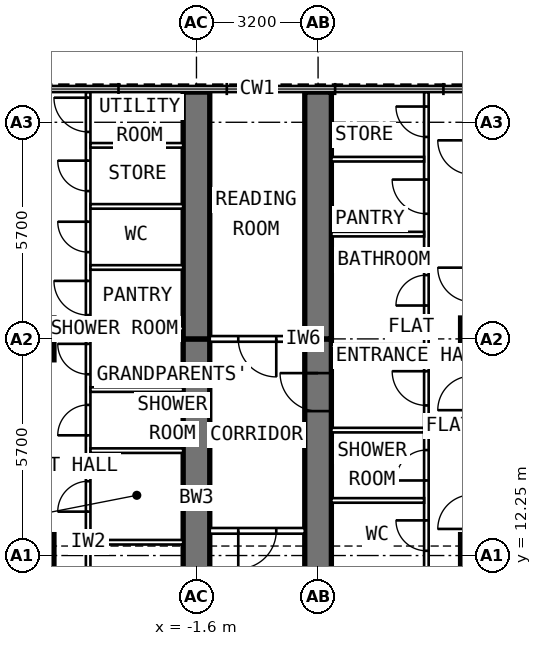
"""IFC4 building model, lengths in metres.
Left out: names, types, materials, properties, quantities, classifications, styles, units other than length and angle.
Written with IfcOpenShell. Run it as: python <this file> out.ifc"""

import sys

from ifc_helpers import new_model, si_unit, direction, frame, frame_2d, origin, origin_2d, place, context, subcontext, project, spatial, rectangle, extrude, element, fill, save


model = new_model("IFC4")
c1 = context("Model", 3, precision=1e-05, world=origin(), true_north=direction((0.0, 1.0)))
c2 = subcontext(c1, "Body", "Model", "MODEL_VIEW")
j1 = project(units=[si_unit("LENGTHUNIT", "METRE"), si_unit("PLANEANGLEUNIT", "RADIAN")], contexts=[c1])
p1 = place(None, origin())
s1 = spatial("IfcSite", under=j1, at=p1, CompositionType="ELEMENT")
p2 = place(p1, origin())
s2 = spatial("IfcBuilding", under=s1, at=p2, CompositionType="ELEMENT")
p3 = place(p2, frame((0.0, 0.0, 215.4)))
s3 = spatial("IfcBuildingStorey", under=s2, at=p3, CompositionType="ELEMENT", Elevation=215.4)
for number, where, z_axis, x_axis in (
    (1, (-5.9, 12.25, 0.0), (0.0, 0.0, 1.0), (0.0, 1.0, 0.0)),
    (2, (-5.9, 17.95, 0.0), (0.0, 0.0, 1.0), (0.0, 1.0, 0.0)),
    (3, (5.9, 12.25, 0.0), (0.0, 0.0, 1.0), (0.0, 1.0, 0.0)),
    (4, (5.9, 17.95, 0.0), (0.0, 0.0, 1.0), (0.0, 1.0, 0.0)),
):
    element("IfcColumn", number, at=place(p3, frame(where, z_axis=z_axis, x_axis=x_axis)), inside=s3, PredefinedType="COLUMN", context=c2, shape_type="SweptSolid", body=[
        extrude(rectangle(XDim=1.1, YDim=1.1, at=origin_2d()), origin(), (0.0, 0.0, 1.0), 3.6),
    ])
p4 = place(p3, frame((-1.6, 9.6, 0.0), z_axis=(0.0, 0.0, 1.0), x_axis=(0.0, 1.0, 0.0)))
e5 = element("IfcWall", 5, at=p4, inside=s3, PredefinedType="SHEAR", context=c2, shape_type="SweptSolid", body=[
    extrude(rectangle(XDim=8.35, YDim=0.7, at=frame_2d((4.175, 0.0))), origin(), (0.0, 0.0, 1.0), 3.6),
])
p5 = place(p4, frame((1.3, 0.0, 0.0)))
e6 = element("IfcOpeningElement", 6, at=p5, cuts=e5, PredefinedType="OPENING", context=c2, shape_type="SweptSolid", body=[
    extrude(rectangle(XDim=1.0, YDim=2.1, at=frame_2d((0.5, 1.05))), frame((0.0, 0.362, 0.0), z_axis=(0.0, -1.0, 0.0), x_axis=(1.0, 0.0, 0.0)), (0.0, 0.0, 1.0), 0.724),
])
p6 = place(p3, frame((-1.6, 17.95, 0.0), z_axis=(0.0, 0.0, 1.0), x_axis=(0.0, 1.0, 0.0)))
e7 = element("IfcWall", 7, at=p6, inside=s3, PredefinedType="SHEAR", context=c2, shape_type="SweptSolid", body=[
    extrude(rectangle(XDim=6.495, YDim=0.7, at=frame_2d((3.248, 0.0))), origin(), (0.0, 0.0, 1.0), 3.6),
])
p7 = place(p3, frame((1.6, 9.6, 0.0), z_axis=(0.0, 0.0, 1.0), x_axis=(0.0, 1.0, 0.0)))
e8 = element("IfcWall", 8, at=p7, inside=s3, PredefinedType="SHEAR", context=c2, shape_type="SweptSolid", body=[
    extrude(rectangle(XDim=8.35, YDim=0.7, at=frame_2d((4.175, 0.0))), origin(), (0.0, 0.0, 1.0), 3.6),
])
p8 = place(p7, frame((6.45, 0.0, 0.0)))
e9 = element("IfcOpeningElement", 9, at=p8, cuts=e8, PredefinedType="OPENING", context=c2, shape_type="SweptSolid", body=[
    extrude(rectangle(XDim=1.0, YDim=2.1, at=frame_2d((0.5, 1.05))), frame((0.0, 0.362, 0.0), z_axis=(0.0, -1.0, 0.0), x_axis=(1.0, 0.0, 0.0)), (0.0, 0.0, 1.0), 0.724),
])
p9 = place(p3, frame((1.6, 17.95, 0.0), z_axis=(0.0, 0.0, 1.0), x_axis=(0.0, 1.0, 0.0)))
e10 = element("IfcWall", 10, at=p9, inside=s3, PredefinedType="SHEAR", context=c2, shape_type="SweptSolid", body=[
    extrude(rectangle(XDim=6.495, YDim=0.7, at=frame_2d((3.248, 0.0))), origin(), (0.0, 0.0, 1.0), 3.6),
])
p10 = place(p3, frame((-4.45, 9.925, 0.0), z_axis=(0.0, 0.0, 1.0), x_axis=(0.0, 1.0, 0.0)))
e11 = element("IfcWall", 11, at=p10, inside=s3, PredefinedType="PARTITIONING", context=c2, shape_type="SweptSolid", body=[
    extrude(rectangle(XDim=14.52, YDim=0.12, at=frame_2d((7.26, 0.0))), origin(), (0.0, 0.0, 1.0), 3.35),
])
p11 = place(p10, frame((0.925, 0.0, 0.0)))
e12 = element("IfcOpeningElement", 12, at=p11, cuts=e11, PredefinedType="OPENING", context=c2, shape_type="SweptSolid", body=[
    extrude(rectangle(XDim=0.9, YDim=2.1, at=frame_2d((0.45, 1.05))), frame((0.0, 0.072, 0.0), z_axis=(0.0, -1.0, 0.0), x_axis=(1.0, 0.0, 0.0)), (0.0, 0.0, 1.0), 0.144),
])
p12 = place(p10, frame((3.48, 0.0, 0.0)))
e13 = element("IfcOpeningElement", 13, at=p12, cuts=e11, PredefinedType="OPENING", context=c2, shape_type="SweptSolid", body=[
    extrude(rectangle(XDim=0.8, YDim=2.1, at=frame_2d((0.4, 1.05))), frame((0.0, 0.072, 0.0), z_axis=(0.0, -1.0, 0.0), x_axis=(1.0, 0.0, 0.0)), (0.0, 0.0, 1.0), 0.144),
])
p13 = place(p10, frame((5.488, 0.0, 0.0)))
e14 = element("IfcOpeningElement", 14, at=p13, cuts=e11, PredefinedType="OPENING", context=c2, shape_type="SweptSolid", body=[
    extrude(rectangle(XDim=0.8, YDim=2.1, at=frame_2d((0.4, 1.05))), frame((0.0, 0.072, 0.0), z_axis=(0.0, -1.0, 0.0), x_axis=(1.0, 0.0, 0.0)), (0.0, 0.0, 1.0), 0.144),
])
p14 = place(p10, frame((7.095, 0.0, 0.0)))
e15 = element("IfcOpeningElement", 15, at=p14, cuts=e11, PredefinedType="OPENING", context=c2, shape_type="SweptSolid", body=[
    extrude(rectangle(XDim=0.8, YDim=2.1, at=frame_2d((0.4, 1.05))), frame((0.0, 0.072, 0.0), z_axis=(0.0, -1.0, 0.0), x_axis=(1.0, 0.0, 0.0)), (0.0, 0.0, 1.0), 0.144),
])
p15 = place(p10, frame((8.652, 0.0, 0.0)))
e16 = element("IfcOpeningElement", 16, at=p15, cuts=e11, PredefinedType="OPENING", context=c2, shape_type="SweptSolid", body=[
    extrude(rectangle(XDim=0.9, YDim=2.1, at=frame_2d((0.45, 1.05))), frame((0.0, 0.072, 0.0), z_axis=(0.0, -1.0, 0.0), x_axis=(1.0, 0.0, 0.0)), (0.0, 0.0, 1.0), 0.144),
])
p16 = place(p10, frame((10.308, 0.0, 0.0)))
e17 = element("IfcOpeningElement", 17, at=p16, cuts=e11, PredefinedType="OPENING", context=c2, shape_type="SweptSolid", body=[
    extrude(rectangle(XDim=0.8, YDim=2.1, at=frame_2d((0.4, 1.05))), frame((0.0, 0.072, 0.0), z_axis=(0.0, -1.0, 0.0), x_axis=(1.0, 0.0, 0.0)), (0.0, 0.0, 1.0), 0.144),
])
p17 = place(p10, frame((11.915, 0.0, 0.0)))
e18 = element("IfcOpeningElement", 18, at=p17, cuts=e11, PredefinedType="OPENING", context=c2, shape_type="SweptSolid", body=[
    extrude(rectangle(XDim=0.8, YDim=2.1, at=frame_2d((0.4, 1.05))), frame((0.0, 0.072, 0.0), z_axis=(0.0, -1.0, 0.0), x_axis=(1.0, 0.0, 0.0)), (0.0, 0.0, 1.0), 0.144),
])
p18 = place(p10, frame((13.472, 0.0, 0.0)))
e19 = element("IfcOpeningElement", 19, at=p18, cuts=e11, PredefinedType="OPENING", context=c2, shape_type="SweptSolid", body=[
    extrude(rectangle(XDim=0.9, YDim=2.1, at=frame_2d((0.45, 1.05))), frame((0.0, 0.072, 0.0), z_axis=(0.0, -1.0, 0.0), x_axis=(1.0, 0.0, 0.0)), (0.0, 0.0, 1.0), 0.144),
])
p19 = place(p3, frame((-1.95, 12.6, 0.0), z_axis=(0.0, 0.0, 1.0), x_axis=(-1.0, 0.0, 0.0)))
e20 = element("IfcWall", 20, at=p19, inside=s3, PredefinedType="PARTITIONING", context=c2, shape_type="SweptSolid", body=[
    extrude(rectangle(XDim=2.44, YDim=0.12, at=frame_2d((1.22, 0.0))), origin(), (0.0, 0.0, 1.0), 2.45),
])
for number, where, z_axis, x_axis in (
    (21, (-1.95, 15.01, 0.0), (0.0, 0.0, 1.0), (-1.0, 0.0, 0.0)),
    (22, (-1.95, 16.617, 0.0), (0.0, 0.0, 1.0), (-1.0, 0.0, 0.0)),
):
    element("IfcWall", number, at=place(p3, frame(where, z_axis=z_axis, x_axis=x_axis)), inside=s3, PredefinedType="PARTITIONING", context=c2, shape_type="SweptSolid", body=[
        extrude(rectangle(XDim=2.44, YDim=0.12, at=frame_2d((1.22, 0.0))), origin(), (0.0, 0.0, 1.0), 3.35),
    ])
p20 = place(p3, frame((-1.95, 18.223, 0.0), z_axis=(0.0, 0.0, 1.0), x_axis=(-1.0, 0.0, 0.0)))
e23 = element("IfcWall", 23, at=p20, inside=s3, PredefinedType="PARTITIONING", context=c2, shape_type="SweptSolid", body=[
    extrude(rectangle(XDim=2.44, YDim=0.12, at=frame_2d((1.22, 0.0))), origin(), (0.0, 0.0, 1.0), 2.45),
])
for number, where, z_axis, x_axis in (
    (24, (-1.95, 19.83, 0.0), (0.0, 0.0, 1.0), (-1.0, 0.0, 0.0)),
    (25, (-1.95, 21.437, 0.0), (0.0, 0.0, 1.0), (-1.0, 0.0, 0.0)),
    (26, (-1.95, 23.043, 0.0), (0.0, 0.0, 1.0), (-1.0, 0.0, 0.0)),
):
    element("IfcWall", number, at=place(p3, frame(where, z_axis=z_axis, x_axis=x_axis)), inside=s3, PredefinedType="PARTITIONING", context=c2, shape_type="SweptSolid", body=[
        extrude(rectangle(XDim=2.44, YDim=0.12, at=frame_2d((1.22, 0.0))), origin(), (0.0, 0.0, 1.0), 3.35),
    ])
p21 = place(p3, frame((4.45, 9.925, 0.0), z_axis=(0.0, 0.0, 1.0), x_axis=(0.0, 1.0, 0.0)))
e27 = element("IfcWall", 27, at=p21, inside=s3, PredefinedType="PARTITIONING", context=c2, shape_type="SweptSolid", body=[
    extrude(rectangle(XDim=14.52, YDim=0.12, at=frame_2d((7.26, 0.0))), origin(), (0.0, 0.0, 1.0), 3.35),
])
p22 = place(p21, frame((0.55, 0.0, 0.0)))
e28 = element("IfcOpeningElement", 28, at=p22, cuts=e27, PredefinedType="OPENING", context=c2, shape_type="SweptSolid", body=[
    extrude(rectangle(XDim=0.9, YDim=2.1, at=frame_2d((0.45, 1.05))), frame((0.0, 0.072, 0.0), z_axis=(0.0, -1.0, 0.0), x_axis=(1.0, 0.0, 0.0)), (0.0, 0.0, 1.0), 0.144),
])
p23 = place(p21, frame((2.45, 0.0, 0.0)))
e29 = element("IfcOpeningElement", 29, at=p23, cuts=e27, PredefinedType="OPENING", context=c2, shape_type="SweptSolid", body=[
    extrude(rectangle(XDim=0.8, YDim=2.1, at=frame_2d((0.4, 1.05))), frame((0.0, 0.072, 0.0), z_axis=(0.0, -1.0, 0.0), x_axis=(1.0, 0.0, 0.0)), (0.0, 0.0, 1.0), 0.144),
])
p24 = place(p21, frame((4.3, 0.0, 0.0)))
e30 = element("IfcOpeningElement", 30, at=p24, cuts=e27, PredefinedType="OPENING", context=c2, shape_type="SweptSolid", body=[
    extrude(rectangle(XDim=0.8, YDim=2.1, at=frame_2d((0.4, 1.05))), frame((0.0, 0.072, 0.0), z_axis=(0.0, -1.0, 0.0), x_axis=(1.0, 0.0, 0.0)), (0.0, 0.0, 1.0), 0.144),
])
p25 = place(p21, frame((6.275, 0.0, 0.0)))
e31 = element("IfcOpeningElement", 31, at=p25, cuts=e27, PredefinedType="OPENING", context=c2, shape_type="SweptSolid", body=[
    extrude(rectangle(XDim=0.9, YDim=2.1, at=frame_2d((0.45, 1.05))), frame((0.0, 0.072, 0.0), z_axis=(0.0, -1.0, 0.0), x_axis=(1.0, 0.0, 0.0)), (0.0, 0.0, 1.0), 0.144),
])
p26 = place(p21, frame((8.904, 0.0, 0.0)))
e32 = element("IfcOpeningElement", 32, at=p26, cuts=e27, PredefinedType="OPENING", context=c2, shape_type="SweptSolid", body=[
    extrude(rectangle(XDim=0.8, YDim=2.1, at=frame_2d((0.4, 1.05))), frame((0.0, 0.072, 0.0), z_axis=(0.0, -1.0, 0.0), x_axis=(1.0, 0.0, 0.0)), (0.0, 0.0, 1.0), 0.144),
])
p27 = place(p21, frame((11.318, 0.0, 0.0)))
e33 = element("IfcOpeningElement", 33, at=p27, cuts=e27, PredefinedType="OPENING", context=c2, shape_type="SweptSolid", body=[
    extrude(rectangle(XDim=0.9, YDim=2.1, at=frame_2d((0.45, 1.05))), frame((0.0, 0.072, 0.0), z_axis=(0.0, -1.0, 0.0), x_axis=(1.0, 0.0, 0.0)), (0.0, 0.0, 1.0), 0.144),
])
p28 = place(p21, frame((13.339, 0.0, 0.0)))
e34 = element("IfcOpeningElement", 34, at=p28, cuts=e27, PredefinedType="OPENING", context=c2, shape_type="SweptSolid", body=[
    extrude(rectangle(XDim=0.8, YDim=2.1, at=frame_2d((0.4, 1.05))), frame((0.0, 0.072, 0.0), z_axis=(0.0, -1.0, 0.0), x_axis=(1.0, 0.0, 0.0)), (0.0, 0.0, 1.0), 0.144),
])
for number, where, z_axis, x_axis in (
    (35, (1.95, 13.7, 0.0), (0.0, 0.0, 1.0), (1.0, 0.0, 0.0)),
    (36, (1.95, 15.55, 0.0), (0.0, 0.0, 1.0), (1.0, 0.0, 0.0)),
):
    element("IfcWall", number, at=place(p3, frame(where, z_axis=z_axis, x_axis=x_axis)), inside=s3, PredefinedType="PARTITIONING", context=c2, shape_type="SweptSolid", body=[
        extrude(rectangle(XDim=2.44, YDim=0.12, at=frame_2d((1.22, 0.0))), origin(), (0.0, 0.0, 1.0), 3.35),
    ])
p29 = place(p3, frame((1.95, 17.75, 0.0), z_axis=(0.0, 0.0, 1.0), x_axis=(1.0, 0.0, 0.0)))
e37 = element("IfcWall", 37, at=p29, inside=s3, PredefinedType="PARTITIONING", context=c2, shape_type="SweptSolid", body=[
    extrude(rectangle(XDim=2.44, YDim=0.12, at=frame_2d((1.22, 0.0))), origin(), (0.0, 0.0, 1.0), 2.45),
])
for number, where, z_axis, x_axis in (
    (38, (1.95, 20.707, 0.0), (0.0, 0.0, 1.0), (1.0, 0.0, 0.0)),
    (39, (1.95, 22.678, 0.0), (0.0, 0.0, 1.0), (1.0, 0.0, 0.0)),
):
    element("IfcWall", number, at=place(p3, frame(where, z_axis=z_axis, x_axis=x_axis)), inside=s3, PredefinedType="PARTITIONING", context=c2, shape_type="SweptSolid", body=[
        extrude(rectangle(XDim=2.44, YDim=0.12, at=frame_2d((1.22, 0.0))), origin(), (0.0, 0.0, 1.0), 3.35),
    ])
p30 = place(p3, frame((1.25, 17.95, 0.0), z_axis=(0.0, 0.0, 1.0), x_axis=(-1.0, 0.0, 0.0)))
e40 = element("IfcWall", 40, at=p30, inside=s3, PredefinedType="PARTITIONING", context=c2, shape_type="SweptSolid", body=[
    extrude(rectangle(XDim=2.5, YDim=0.15, at=frame_2d((1.25, 0.0))), origin(), (0.0, 0.0, 1.0), 3.35),
])
p31 = place(p30, frame((0.75, 0.0, 0.0)))
e41 = element("IfcOpeningElement", 41, at=p31, cuts=e40, PredefinedType="OPENING", context=c2, shape_type="SweptSolid", body=[
    extrude(rectangle(XDim=1.0, YDim=2.1, at=frame_2d((0.5, 1.05))), frame((0.0, 0.087, 0.0), z_axis=(0.0, -1.0, 0.0), x_axis=(1.0, 0.0, 0.0)), (0.0, 0.0, 1.0), 0.174),
])
p32 = place(p3, frame((1.25, 12.9, 0.0), z_axis=(0.0, 0.0, 1.0), x_axis=(-1.0, 0.0, 0.0)))
e42 = element("IfcWall", 42, at=p32, inside=s3, PredefinedType="PARTITIONING", context=c2, shape_type="SweptSolid", body=[
    extrude(rectangle(XDim=2.5, YDim=0.15, at=frame_2d((1.25, 0.0))), origin(), (0.0, 0.0, 1.0), 3.35),
])
p33 = place(p32, frame((0.75, 0.0, 0.0)))
e43 = element("IfcOpeningElement", 43, at=p33, cuts=e42, PredefinedType="OPENING", context=c2, shape_type="SweptSolid", body=[
    extrude(rectangle(XDim=1.0, YDim=2.1, at=frame_2d((0.5, 1.05))), frame((0.0, 0.087, 0.0), z_axis=(0.0, -1.0, 0.0), x_axis=(1.0, 0.0, 0.0)), (0.0, 0.0, 1.0), 0.174),
])
p34 = place(p12, origin())
e44 = element("IfcDoor", 44, at=p34, inside=s3, OperationType="SINGLE_SWING_LEFT", PredefinedType="DOOR", context=c2, shape_type="SweptSolid", body=[
    extrude(rectangle(XDim=0.8, YDim=2.1, at=frame_2d((0.4, 1.05))), frame((0.0, 0.025, 0.0), z_axis=(0.0, -1.0, 0.0), x_axis=(1.0, 0.0, 0.0)), (0.0, 0.0, 1.0), 0.05),
])
fill(e13, e44)
p35 = place(p13, origin())
e45 = element("IfcDoor", 45, at=p35, inside=s3, OperationType="SINGLE_SWING_LEFT", PredefinedType="DOOR", context=c2, shape_type="SweptSolid", body=[
    extrude(rectangle(XDim=0.8, YDim=2.1, at=frame_2d((0.4, 1.05))), frame((0.0, 0.025, 0.0), z_axis=(0.0, -1.0, 0.0), x_axis=(1.0, 0.0, 0.0)), (0.0, 0.0, 1.0), 0.05),
])
fill(e14, e45)
p36 = place(p14, origin())
e46 = element("IfcDoor", 46, at=p36, inside=s3, OperationType="SINGLE_SWING_RIGHT", PredefinedType="DOOR", context=c2, shape_type="SweptSolid", body=[
    extrude(rectangle(XDim=0.8, YDim=2.1, at=frame_2d((0.4, 1.05))), frame((0.0, 0.025, 0.0), z_axis=(0.0, -1.0, 0.0), x_axis=(1.0, 0.0, 0.0)), (0.0, 0.0, 1.0), 0.05),
])
fill(e15, e46)
p37 = place(p15, origin())
e47 = element("IfcDoor", 47, at=p37, inside=s3, OperationType="SINGLE_SWING_RIGHT", PredefinedType="DOOR", context=c2, shape_type="SweptSolid", body=[
    extrude(rectangle(XDim=0.9, YDim=2.1, at=frame_2d((0.45, 1.05))), frame((0.0, 0.025, 0.0), z_axis=(0.0, -1.0, 0.0), x_axis=(1.0, 0.0, 0.0)), (0.0, 0.0, 1.0), 0.05),
])
fill(e16, e47)
p38 = place(p16, origin())
e48 = element("IfcDoor", 48, at=p38, inside=s3, OperationType="SINGLE_SWING_RIGHT", PredefinedType="DOOR", context=c2, shape_type="SweptSolid", body=[
    extrude(rectangle(XDim=0.8, YDim=2.1, at=frame_2d((0.4, 1.05))), frame((0.0, 0.025, 0.0), z_axis=(0.0, -1.0, 0.0), x_axis=(1.0, 0.0, 0.0)), (0.0, 0.0, 1.0), 0.05),
])
fill(e17, e48)
p39 = place(p17, origin())
e49 = element("IfcDoor", 49, at=p39, inside=s3, OperationType="SINGLE_SWING_RIGHT", PredefinedType="DOOR", context=c2, shape_type="SweptSolid", body=[
    extrude(rectangle(XDim=0.8, YDim=2.1, at=frame_2d((0.4, 1.05))), frame((0.0, 0.025, 0.0), z_axis=(0.0, -1.0, 0.0), x_axis=(1.0, 0.0, 0.0)), (0.0, 0.0, 1.0), 0.05),
])
fill(e18, e49)
p40 = place(p18, origin())
e50 = element("IfcDoor", 50, at=p40, inside=s3, OperationType="SINGLE_SWING_RIGHT", PredefinedType="DOOR", context=c2, shape_type="SweptSolid", body=[
    extrude(rectangle(XDim=0.9, YDim=2.1, at=frame_2d((0.45, 1.05))), frame((0.0, 0.025, 0.0), z_axis=(0.0, -1.0, 0.0), x_axis=(1.0, 0.0, 0.0)), (0.0, 0.0, 1.0), 0.05),
])
fill(e19, e50)
p41 = place(p8, origin())
e51 = element("IfcDoor", 51, at=p41, inside=s3, OperationType="SINGLE_SWING_RIGHT", PredefinedType="DOOR", context=c2, shape_type="SweptSolid", body=[
    extrude(rectangle(XDim=1.0, YDim=2.1, at=frame_2d((0.5, 1.05))), frame((0.0, 0.1, 0.0), z_axis=(0.0, -1.0, 0.0), x_axis=(1.0, 0.0, 0.0)), (0.0, 0.0, 1.0), 0.2),
])
fill(e9, e51)
p42 = place(p23, origin())
e52 = element("IfcDoor", 52, at=p42, inside=s3, OperationType="SINGLE_SWING_RIGHT", PredefinedType="DOOR", context=c2, shape_type="SweptSolid", body=[
    extrude(rectangle(XDim=0.8, YDim=2.1, at=frame_2d((0.4, 1.05))), frame((0.0, 0.025, 0.0), z_axis=(0.0, -1.0, 0.0), x_axis=(1.0, 0.0, 0.0)), (0.0, 0.0, 1.0), 0.05),
])
fill(e29, e52)
p43 = place(p24, origin())
e53 = element("IfcDoor", 53, at=p43, inside=s3, OperationType="SINGLE_SWING_LEFT", PredefinedType="DOOR", context=c2, shape_type="SweptSolid", body=[
    extrude(rectangle(XDim=0.8, YDim=2.1, at=frame_2d((0.4, 1.05))), frame((0.0, 0.025, 0.0), z_axis=(0.0, -1.0, 0.0), x_axis=(1.0, 0.0, 0.0)), (0.0, 0.0, 1.0), 0.05),
])
fill(e30, e53)
p44 = place(p25, origin())
e54 = element("IfcDoor", 54, at=p44, inside=s3, OperationType="SINGLE_SWING_RIGHT", PredefinedType="DOOR", context=c2, shape_type="SweptSolid", body=[
    extrude(rectangle(XDim=0.9, YDim=2.1, at=frame_2d((0.45, 1.05))), frame((0.0, 0.025, 0.0), z_axis=(0.0, -1.0, 0.0), x_axis=(1.0, 0.0, 0.0)), (0.0, 0.0, 1.0), 0.05),
])
fill(e31, e54)
p45 = place(p26, origin())
e55 = element("IfcDoor", 55, at=p45, inside=s3, OperationType="SINGLE_SWING_LEFT", PredefinedType="DOOR", context=c2, shape_type="SweptSolid", body=[
    extrude(rectangle(XDim=0.8, YDim=2.1, at=frame_2d((0.4, 1.05))), frame((0.0, 0.025, 0.0), z_axis=(0.0, -1.0, 0.0), x_axis=(1.0, 0.0, 0.0)), (0.0, 0.0, 1.0), 0.05),
])
fill(e32, e55)
p46 = place(p27, origin())
e56 = element("IfcDoor", 56, at=p46, inside=s3, OperationType="SINGLE_SWING_RIGHT", PredefinedType="DOOR", context=c2, shape_type="SweptSolid", body=[
    extrude(rectangle(XDim=0.9, YDim=2.1, at=frame_2d((0.45, 1.05))), frame((0.0, 0.025, 0.0), z_axis=(0.0, -1.0, 0.0), x_axis=(1.0, 0.0, 0.0)), (0.0, 0.0, 1.0), 0.05),
])
fill(e33, e56)
p47 = place(p28, origin())
e57 = element("IfcDoor", 57, at=p47, inside=s3, OperationType="SINGLE_SWING_RIGHT", PredefinedType="DOOR", context=c2, shape_type="SweptSolid", body=[
    extrude(rectangle(XDim=0.8, YDim=2.1, at=frame_2d((0.4, 1.05))), frame((0.0, 0.025, 0.0), z_axis=(0.0, -1.0, 0.0), x_axis=(1.0, 0.0, 0.0)), (0.0, 0.0, 1.0), 0.05),
])
fill(e34, e57)
p48 = place(p31, origin())
e58 = element("IfcDoor", 58, at=p48, inside=s3, OperationType="SINGLE_SWING_LEFT", PredefinedType="DOOR", context=c2, shape_type="SweptSolid", body=[
    extrude(rectangle(XDim=1.0, YDim=2.1, at=frame_2d((0.5, 1.05))), frame((0.0, 0.025, 0.0), z_axis=(0.0, -1.0, 0.0), x_axis=(1.0, 0.0, 0.0)), (0.0, 0.0, 1.0), 0.05),
])
fill(e41, e58)
p49 = place(p33, origin())
e59 = element("IfcDoor", 59, at=p49, inside=s3, OperationType="SINGLE_SWING_RIGHT", PredefinedType="DOOR", context=c2, shape_type="SweptSolid", body=[
    extrude(rectangle(XDim=1.0, YDim=2.1, at=frame_2d((0.5, 1.05))), frame((0.0, 0.025, 0.0), z_axis=(0.0, -1.0, 0.0), x_axis=(1.0, 0.0, 0.0)), (0.0, 0.0, 1.0), 0.05),
])
fill(e43, e59)
save(model, sys.argv[1])
